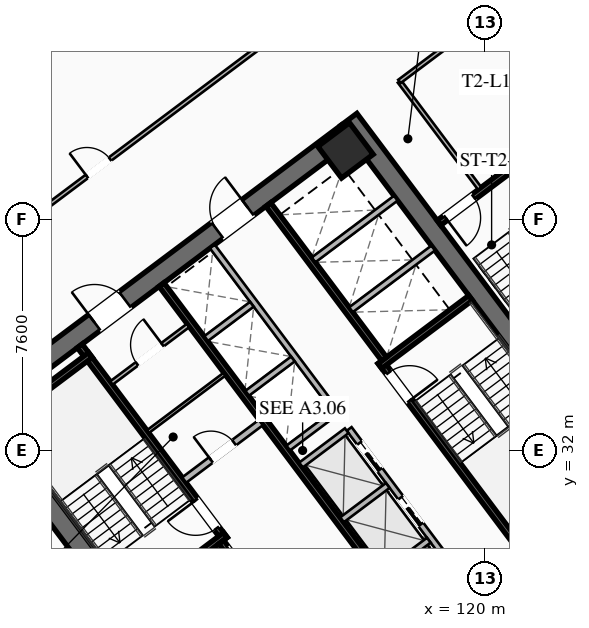
"""IFC4 building model, lengths in metres.
Left out: names, types, materials, properties, quantities, classifications, styles, units other than length and angle.
Written with IfcOpenShell. Run it as: python <this file> out.ifc"""

import sys

from ifc_helpers import new_model, si_unit, direction, frame, frame_2d, origin, origin_2d, place, context, subcontext, project, spatial, rectangle, hollow_rectangle, extrude, element, fill, save


model = new_model("IFC4")
c1 = context("Model", 3, precision=1e-05, world=origin(), true_north=direction((0.0, 1.0)))
c2 = subcontext(c1, "Body", "Model", "MODEL_VIEW")
j1 = project(units=[si_unit("LENGTHUNIT", "METRE"), si_unit("PLANEANGLEUNIT", "RADIAN")], contexts=[c1])
p1 = place(None, origin())
s1 = spatial("IfcSite", under=j1, at=p1, CompositionType="ELEMENT")
p2 = place(p1, origin())
s2 = spatial("IfcBuilding", under=s1, at=p2, CompositionType="ELEMENT")
p3 = place(p2, frame((0.0, 0.0, 56.55)))
s3 = spatial("IfcBuildingStorey", under=s2, at=p3, CompositionType="ELEMENT", Elevation=56.55)
for number, where, z_axis, x_axis in (
    (1, (112.476, 21.107, 0.0), (0.0, 0.0, 1.0), (-0.6, 0.8, 0.0)),
    (2, (115.524, 42.893, 0.0), (0.0, 0.0, 1.0), (0.6, -0.8, 0.0)),
):
    element("IfcWall", number, at=place(p3, frame(where, z_axis=z_axis, x_axis=x_axis)), inside=s3, PredefinedType="SHEAR", context=c2, shape_type="SweptSolid", body=[
        extrude(rectangle(XDim=15.6, YDim=0.65, at=frame_2d((7.8, 0.0))), origin(), (0.0, 0.0, 1.0), 3.55),
    ])
p4 = place(p3, frame((124.429, 30.478, 0.0), z_axis=(0.0, 0.0, 1.0), x_axis=(-0.799998028465, -0.600002628705, 0.0)))
e3 = element("IfcWall", 3, at=p4, inside=s3, PredefinedType="SHEAR", context=c2, shape_type="SweptSolid", body=[
    extrude(rectangle(XDim=14.86, YDim=0.65, at=frame_2d((7.43, 0.0))), origin(), (0.0, 0.0, 1.0), 3.55),
])
p5 = place(p4, frame((9.13, 0.0, 0.0)))
e4 = element("IfcOpeningElement", 4, at=p5, cuts=e3, PredefinedType="OPENING", context=c2, shape_type="SweptSolid", body=[
    extrude(rectangle(XDim=1.25, YDim=2.25, at=frame_2d((0.625, 1.125))), frame((0.0, 0.335, 0.0), z_axis=(0.0, -1.0, 0.0), x_axis=(1.0, 0.0, 0.0)), (0.0, 0.0, 1.0), 0.67),
])
p6 = place(p4, frame((4.08, 0.0, 0.0)))
e5 = element("IfcOpeningElement", 5, at=p6, cuts=e3, PredefinedType="OPENING", context=c2, shape_type="SweptSolid", body=[
    extrude(rectangle(XDim=1.25, YDim=2.25, at=frame_2d((0.625, 1.125))), frame((0.0, 0.335, 0.0), z_axis=(0.0, -1.0, 0.0), x_axis=(1.0, 0.0, 0.0)), (0.0, 0.0, 1.0), 0.67),
])
p7 = place(p3, frame((103.571, 33.522, 0.0), z_axis=(0.0, 0.0, 1.0), x_axis=(0.799998028465, 0.600002628705, 0.0)))
e6 = element("IfcWall", 6, at=p7, inside=s3, PredefinedType="SHEAR", context=c2, shape_type="SweptSolid", body=[
    extrude(rectangle(XDim=14.86, YDim=0.65, at=frame_2d((7.43, 0.0))), origin(), (0.0, 0.0, 1.0), 3.55),
])
p8 = place(p7, frame((4.48, 0.0, 0.0)))
e7 = element("IfcOpeningElement", 7, at=p8, cuts=e6, PredefinedType="OPENING", context=c2, shape_type="SweptSolid", body=[
    extrude(rectangle(XDim=1.25, YDim=2.25, at=frame_2d((0.625, 1.125))), frame((0.0, 0.335, 0.0), z_axis=(0.0, -1.0, 0.0), x_axis=(1.0, 0.0, 0.0)), (0.0, 0.0, 1.0), 0.67),
])
p9 = place(p7, frame((9.53, 0.0, 0.0)))
e8 = element("IfcOpeningElement", 8, at=p9, cuts=e6, PredefinedType="OPENING", context=c2, shape_type="SweptSolid", body=[
    extrude(rectangle(XDim=1.25, YDim=2.25, at=frame_2d((0.625, 1.125))), frame((0.0, 0.335, 0.0), z_axis=(0.0, -1.0, 0.0), x_axis=(1.0, 0.0, 0.0)), (0.0, 0.0, 1.0), 0.67),
])
p10 = place(p3, frame((115.41, 41.87, 0.0), z_axis=(0.0, 0.0, 1.0), x_axis=(0.799999996291, 0.600000004945, 0.0)))
e9 = element("IfcColumn", 9, at=p10, inside=s3, PredefinedType="COLUMN", context=c2, shape_type="SweptSolid", body=[
    extrude(hollow_rectangle(XDim=1.3, YDim=1.3, WallThickness=0.05, at=origin_2d()), origin(), (0.0, 0.0, 1.0), 3.35),
])
p11 = place(p3, frame((111.44, 29.08, 0.0), z_axis=(0.0, 0.0, 1.0), x_axis=(-0.600009827119, 0.799992629566, 0.0)))
e10 = element("IfcWall", 10, at=p11, inside=s3, PredefinedType="SHEAR", context=c2, shape_type="SweptSolid", body=[
    extrude(rectangle(XDim=7.95, YDim=0.2, at=frame_2d((3.975, 0.0))), origin(), (0.0, 0.0, 1.0), 3.35),
])
p12 = place(p11, frame((0.45, 0.0, 0.0)))
e11 = element("IfcOpeningElement", 11, at=p12, cuts=e10, PredefinedType="OPENING", context=c2, shape_type="SweptSolid", body=[
    extrude(rectangle(XDim=1.15, YDim=2.2, at=frame_2d((0.575, 1.1))), frame((0.0, 0.11, 0.0), z_axis=(0.0, -1.0, 0.0), x_axis=(1.0, 0.0, 0.0)), (0.0, 0.0, 1.0), 0.22),
])
for number, where, z_axis, x_axis in (
    (12, (108.476, 26.982, 0.0), (0.0, 0.0, 1.0), (0.8, 0.6, 0.0)),
    (13, (104.036, 32.902, 0.0), (0.0, 0.0, 1.0), (0.8, 0.6, 0.0)),
):
    element("IfcWall", number, at=place(p3, frame(where, z_axis=z_axis, x_axis=x_axis)), inside=s3, PredefinedType="SHEAR", context=c2, shape_type="SweptSolid", body=[
        extrude(rectangle(XDim=3.73, YDim=0.2, at=frame_2d((1.865, 0.0))), origin(), (0.0, 0.0, 1.0), 3.35),
    ])
p13 = place(p3, frame((116.56, 34.92, 0.0), z_axis=(0.0, 0.0, 1.0), x_axis=(0.600009827119, -0.799992629566, 0.0)))
e14 = element("IfcWall", 14, at=p13, inside=s3, PredefinedType="SHEAR", context=c2, shape_type="SweptSolid", body=[
    extrude(rectangle(XDim=7.95, YDim=0.2, at=frame_2d((3.975, 0.0))), origin(), (0.0, 0.0, 1.0), 3.35),
])
p14 = place(p13, frame((0.45, 0.0, 0.0)))
e15 = element("IfcOpeningElement", 15, at=p14, cuts=e14, PredefinedType="OPENING", context=c2, shape_type="SweptSolid", body=[
    extrude(rectangle(XDim=1.15, YDim=2.2, at=frame_2d((0.575, 1.1))), frame((0.0, 0.11, 0.0), z_axis=(0.0, -1.0, 0.0), x_axis=(1.0, 0.0, 0.0)), (0.0, 0.0, 1.0), 0.22),
])
p15 = place(p3, frame((116.54, 34.78, 0.0), z_axis=(0.0, 0.0, 1.0), x_axis=(0.799984290658, 0.600020945218, 0.0)))
e16 = element("IfcWall", 16, at=p15, inside=s3, PredefinedType="SHEAR", context=c2, shape_type="SweptSolid", body=[
    extrude(rectangle(XDim=3.73, YDim=0.2, at=frame_2d((1.865, 0.0))), origin(), (0.0, 0.0, 1.0), 3.35),
])
p16 = place(p3, frame((117.938, 26.016, 0.0), z_axis=(0.0, 0.0, 1.0), x_axis=(-0.600005463273, 0.799995902516, 0.0)))
e17 = element("IfcWall", 17, at=p16, inside=s3, PredefinedType="SHEAR", context=c2, shape_type="SweptSolid", body=[
    extrude(rectangle(XDim=14.3, YDim=0.2, at=frame_2d((7.15, 0.0))), origin(), (0.0, 0.0, 1.0), 3.35),
])
p17 = place(p3, frame((110.104, 31.028, 0.0), z_axis=(0.0, 0.0, 1.0), x_axis=(0.800018601094, 0.59997519774, 0.0)))
e18 = element("IfcWall", 18, at=p17, inside=s3, PredefinedType="SOLIDWALL", context=c2, shape_type="SweptSolid", body=[
    extrude(rectangle(XDim=3.15, YDim=0.22, at=frame_2d((1.575, 0.0))), origin(), (0.0, 0.0, 1.0), 2.703),
])
p18 = place(p17, frame((1.1, 0.0, 0.0)))
e19 = element("IfcOpeningElement", 19, at=p18, cuts=e18, PredefinedType="OPENING", context=c2, shape_type="SweptSolid", body=[
    extrude(rectangle(XDim=0.95, YDim=2.05, at=frame_2d((0.475, 1.025))), frame((0.0, 0.12, 0.0), z_axis=(0.0, -1.0, 0.0), x_axis=(1.0, 0.0, 0.0)), (0.0, 0.0, 1.0), 0.24),
])
p19 = place(p3, frame((115.13, 23.91, 0.0), z_axis=(0.0, 0.0, 1.0), x_axis=(-0.599975393228, 0.800018454488, 0.0)))
e20 = element("IfcWall", 20, at=p19, inside=s3, PredefinedType="SHEAR", context=c2, shape_type="SweptSolid", body=[
    extrude(rectangle(XDim=6.35, YDim=0.2, at=frame_2d((3.175, 0.0))), origin(), (0.0, 0.0, 1.0), 3.35),
])
p20 = place(p19, frame((4.775, 0.0, 0.0)))
e21 = element("IfcOpeningElement", 21, at=p20, cuts=e20, PredefinedType="OPENING", context=c2, shape_type="SweptSolid", body=[
    extrude(rectangle(XDim=1.3, YDim=2.25, at=frame_2d((0.65, 1.125))), frame((0.0, 0.11, 0.0), z_axis=(0.0, -1.0, 0.0), x_axis=(1.0, 0.0, 0.0)), (0.0, 0.0, 1.0), 0.22),
])
p21 = place(p19, frame((2.775, 0.0, 0.0)))
e22 = element("IfcOpeningElement", 22, at=p21, cuts=e20, PredefinedType="OPENING", context=c2, shape_type="SweptSolid", body=[
    extrude(rectangle(XDim=1.3, YDim=2.25, at=frame_2d((0.65, 1.125))), frame((0.0, 0.11, 0.0), z_axis=(0.0, -1.0, 0.0), x_axis=(1.0, 0.0, 0.0)), (0.0, 0.0, 1.0), 0.22),
])
p22 = place(p19, frame((0.575, 0.0, 0.0)))
e23 = element("IfcOpeningElement", 23, at=p22, cuts=e20, PredefinedType="OPENING", context=c2, shape_type="SweptSolid", body=[
    extrude(rectangle(XDim=1.3, YDim=2.25, at=frame_2d((0.65, 1.125))), frame((0.0, 0.11, 0.0), z_axis=(0.0, -1.0, 0.0), x_axis=(1.0, 0.0, 0.0)), (0.0, 0.0, 1.0), 0.22),
])
p23 = place(p3, frame((112.87, 40.09, 0.0), z_axis=(0.0, 0.0, 1.0), x_axis=(0.599975393228, -0.800018454488, 0.0)))
e24 = element("IfcWall", 24, at=p23, inside=s3, PredefinedType="SHEAR", context=c2, shape_type="SweptSolid", body=[
    extrude(rectangle(XDim=6.35, YDim=0.2, at=frame_2d((3.175, 0.0))), origin(), (0.0, 0.0, 1.0), 3.35),
])
for number, where, z_axis, x_axis in (
    (25, (115.59, 36.63, 0.0), (0.0, 0.0, 1.0), (0.8, 0.6, 0.0)),
    (26, (114.36, 38.27, 0.0), (0.0, 0.0, 1.0), (0.8, 0.6, 0.0)),
):
    element("IfcWall", number, at=place(p3, frame(where, z_axis=z_axis, x_axis=x_axis)), inside=s3, PredefinedType="SOLIDWALL", context=c2, shape_type="SweptSolid", body=[
        extrude(rectangle(XDim=3.38, YDim=0.2, at=frame_2d((1.69, 0.0))), origin(), (0.0, 0.0, 1.0), 3.35),
    ])
p24 = place(p3, frame((107.71, 34.22, 0.0), z_axis=(0.0, 0.0, 1.0), x_axis=(0.799981399002, 0.60002480053, 0.0)))
e27 = element("IfcWall", 27, at=p24, inside=s3, PredefinedType="PARTITIONING", context=c2, shape_type="SweptSolid", body=[
    extrude(rectangle(XDim=3.15, YDim=0.135, at=frame_2d((1.575, 0.0))), origin(), (0.0, 0.0, 1.0), 2.703),
])
p25 = place(p24, frame((1.05, 0.0, 0.0)))
e28 = element("IfcOpeningElement", 28, at=p25, cuts=e27, PredefinedType="OPENING", context=c2, shape_type="SweptSolid", body=[
    extrude(rectangle(XDim=1.05, YDim=2.2, at=frame_2d((0.525, 1.1))), frame((0.0, 0.077, 0.0), z_axis=(0.0, -1.0, 0.0), x_axis=(1.0, 0.0, 0.0)), (0.0, 0.0, 1.0), 0.155),
])
p26 = place(p3, frame((108.91, 32.62, 0.0), z_axis=(0.0, 0.0, 1.0), x_axis=(0.800018601094, 0.59997519774, 0.0)))
e29 = element("IfcWall", 29, at=p26, inside=s3, PredefinedType="PARTITIONING", context=c2, shape_type="SweptSolid", body=[
    extrude(rectangle(XDim=3.15, YDim=0.11, at=frame_2d((1.575, 0.0))), origin(), (0.0, 0.0, 1.0), 2.703),
])
p27 = place(p3, frame((119.61, 27.27, 0.0), z_axis=(0.0, 0.0, 1.0), x_axis=(-0.600011488909, 0.79999138319, 0.0)))
e30 = element("IfcWall", 30, at=p27, inside=s3, PredefinedType="SOLIDWALL", context=c2, shape_type="SweptSolid", body=[
    extrude(rectangle(XDim=6.8, YDim=0.2, at=frame_2d((3.4, 0.0))), origin(), (0.0, 0.0, 1.0), 3.35),
])
p28 = place(p27, frame((0.625, 0.0, 0.0)))
e31 = element("IfcOpeningElement", 31, at=p28, cuts=e30, PredefinedType="OPENING", context=c2, shape_type="SweptSolid", body=[
    extrude(rectangle(XDim=1.1, YDim=2.2, at=frame_2d((0.55, 1.1))), frame((0.0, 0.11, 0.0), z_axis=(0.0, -1.0, 0.0), x_axis=(1.0, 0.0, 0.0)), (0.0, 0.0, 1.0), 0.22),
])
p29 = place(p27, frame((2.875, 0.0, 0.0)))
e32 = element("IfcOpeningElement", 32, at=p29, cuts=e30, PredefinedType="OPENING", context=c2, shape_type="SweptSolid", body=[
    extrude(rectangle(XDim=1.1, YDim=2.2, at=frame_2d((0.55, 1.1))), frame((0.0, 0.11, 0.0), z_axis=(0.0, -1.0, 0.0), x_axis=(1.0, 0.0, 0.0)), (0.0, 0.0, 1.0), 0.22),
])
p30 = place(p27, frame((5.125, 0.0, 0.0)))
e33 = element("IfcOpeningElement", 33, at=p30, cuts=e30, PredefinedType="OPENING", context=c2, shape_type="SweptSolid", body=[
    extrude(rectangle(XDim=1.1, YDim=2.2, at=frame_2d((0.55, 1.1))), frame((0.0, 0.11, 0.0), z_axis=(0.0, -1.0, 0.0), x_axis=(1.0, 0.0, 0.0)), (0.0, 0.0, 1.0), 0.22),
])
p31 = place(p3, frame((116.646, 27.922, 0.0), z_axis=(0.0, 0.0, 1.0), x_axis=(0.8, 0.6, 0.0)))
e34 = element("IfcWall", 34, at=p31, inside=s3, PredefinedType="SOLIDWALL", context=c2, shape_type="SweptSolid", body=[
    extrude(rectangle(XDim=1.88, YDim=0.2, at=frame_2d((0.94, 0.0))), origin(), (0.0, 0.0, 1.0), 3.35),
])
p32 = place(p3, frame((115.296, 29.722, 0.0), z_axis=(0.0, 0.0, 1.0), x_axis=(0.799984418148, 0.600020775241, 0.0)))
e35 = element("IfcWall", 35, at=p32, inside=s3, PredefinedType="SOLIDWALL", context=c2, shape_type="SweptSolid", body=[
    extrude(rectangle(XDim=1.88, YDim=0.2, at=frame_2d((0.94, 0.0))), origin(), (0.0, 0.0, 1.0), 3.35),
])
p33 = place(p3, frame((113.946, 31.522, 0.0), z_axis=(0.0, 0.0, 1.0), x_axis=(0.8, 0.6, 0.0)))
e36 = element("IfcWall", 36, at=p33, inside=s3, PredefinedType="SOLIDWALL", context=c2, shape_type="SweptSolid", body=[
    extrude(rectangle(XDim=1.88, YDim=0.2, at=frame_2d((0.94, 0.0))), origin(), (0.0, 0.0, 1.0), 3.35),
])
p34 = place(p3, frame((115.11, 33.27, 0.0), z_axis=(0.0, 0.0, 1.0), x_axis=(-0.600011488909, 0.79999138319, 0.0)))
e37 = element("IfcWall", 37, at=p34, inside=s3, PredefinedType="SOLIDWALL", context=c2, shape_type="SweptSolid", body=[
    extrude(rectangle(XDim=6.8, YDim=0.2, at=frame_2d((3.4, 0.0))), origin(), (0.0, 0.0, 1.0), 3.35),
])
p35 = place(p3, frame((113.526, 32.082, 0.0), z_axis=(0.0, 0.0, 1.0), x_axis=(0.800046745961, 0.599937666993, 0.0)))
e38 = element("IfcWall", 38, at=p35, inside=s3, PredefinedType="SOLIDWALL", context=c2, shape_type="SweptSolid", body=[
    extrude(rectangle(XDim=1.88, YDim=0.2, at=frame_2d((0.94, 0.0))), origin(), (0.0, 0.0, 1.0), 3.35),
])
p36 = place(p3, frame((112.176, 33.882, 0.0), z_axis=(0.0, 0.0, 1.0), x_axis=(0.8, 0.6, 0.0)))
e39 = element("IfcWall", 39, at=p36, inside=s3, PredefinedType="SOLIDWALL", context=c2, shape_type="SweptSolid", body=[
    extrude(rectangle(XDim=1.88, YDim=0.2, at=frame_2d((0.94, 0.0))), origin(), (0.0, 0.0, 1.0), 3.35),
])
p37 = place(p3, frame((110.826, 35.682, 0.0), z_axis=(0.0, 0.0, 1.0), x_axis=(0.799984418148, 0.600020775241, 0.0)))
e40 = element("IfcWall", 40, at=p37, inside=s3, PredefinedType="SOLIDWALL", context=c2, shape_type="SweptSolid", body=[
    extrude(rectangle(XDim=1.88, YDim=0.2, at=frame_2d((0.94, 0.0))), origin(), (0.0, 0.0, 1.0), 3.35),
])
p38 = place(p3, frame((121.204, 41.528, 0.0), z_axis=(0.0, 0.0, 1.0), x_axis=(-0.800017232136, -0.599977023131, 0.0)))
e41 = element("IfcWall", 41, at=p38, inside=s3, PredefinedType="SHEAR", context=c2, shape_type="SweptSolid", body=[
    extrude(rectangle(XDim=3.4, YDim=0.2, at=frame_2d((1.7, 0.0))), origin(), (0.0, 0.0, 1.0), 3.35),
])
p39 = place(p38, frame((1.975, 0.0, 0.0)))
e42 = element("IfcOpeningElement", 42, at=p39, cuts=e41, PredefinedType="OPENING", context=c2, shape_type="SweptSolid", body=[
    extrude(rectangle(XDim=1.15, YDim=2.2, at=frame_2d((0.575, 1.1))), frame((0.0, 0.11, 0.0), z_axis=(0.0, -1.0, 0.0), x_axis=(1.0, 0.0, 0.0)), (0.0, 0.0, 1.0), 0.22),
])
p40 = place(p3, frame((119.824, 40.618, 0.0), z_axis=(0.0, 0.0, 1.0), x_axis=(-0.599982243973, 0.800013316712, 0.0)))
e43 = element("IfcWall", 43, at=p40, inside=s3, PredefinedType="PARTITIONING", context=c2, shape_type="SweptSolid", body=[
    extrude(rectangle(XDim=4.4, YDim=0.135, at=frame_2d((2.2, 0.0))), origin(), (0.0, 0.0, 1.0), 2.703),
])
p41 = place(p3, frame((98.174, 34.468, 0.0), z_axis=(0.0, 0.0, 1.0), x_axis=(0.800000982127, 0.599998690494, 0.0)))
e44 = element("IfcWall", 44, at=p41, inside=s3, PredefinedType="PARTITIONING", context=c2, shape_type="SweptSolid", body=[
    extrude(rectangle(XDim=29.83, YDim=0.135, at=frame_2d((14.915, 0.0))), origin(), (0.0, 0.0, 1.0), 2.703),
])
p42 = place(p41, frame((0.3, 0.0, 0.0)))
e45 = element("IfcOpeningElement", 45, at=p42, cuts=e44, PredefinedType="OPENING", context=c2, shape_type="SweptSolid", body=[
    extrude(rectangle(XDim=0.95, YDim=2.05, at=frame_2d((0.475, 1.025))), frame((0.0, 0.077, 0.0), z_axis=(0.0, -1.0, 0.0), x_axis=(1.0, 0.0, 0.0)), (0.0, 0.0, 1.0), 0.155),
])
p43 = place(p41, frame((10.913, 0.0, 0.0)))
e46 = element("IfcOpeningElement", 46, at=p43, cuts=e44, PredefinedType="OPENING", context=c2, shape_type="SweptSolid", body=[
    extrude(rectangle(XDim=0.95, YDim=2.05, at=frame_2d((0.475, 1.025))), frame((0.0, 0.077, 0.0), z_axis=(0.0, -1.0, 0.0), x_axis=(1.0, 0.0, 0.0)), (0.0, 0.0, 1.0), 0.155),
])
p44 = place(p41, frame((28.58, 0.0, 0.0)))
e47 = element("IfcOpeningElement", 47, at=p44, cuts=e44, PredefinedType="OPENING", context=c2, shape_type="SweptSolid", body=[
    extrude(rectangle(XDim=0.95, YDim=2.05, at=frame_2d((0.475, 1.025))), frame((0.0, 0.077, 0.0), z_axis=(0.0, -1.0, 0.0), x_axis=(1.0, 0.0, 0.0)), (0.0, 0.0, 1.0), 0.155),
])
p45 = place(p3, frame((135.46, 34.47, 0.0), z_axis=(0.0, 0.0, 1.0), x_axis=(-0.800000982127, -0.599998690494, 0.0)))
e48 = element("IfcWall", 48, at=p45, inside=s3, PredefinedType="PARTITIONING", context=c2, shape_type="SweptSolid", body=[
    extrude(rectangle(XDim=29.83, YDim=0.135, at=frame_2d((14.915, 0.0))), origin(), (0.0, 0.0, 1.0), 2.703),
])
p46 = place(p45, frame((28.5, 0.0, 0.0)))
e49 = element("IfcOpeningElement", 49, at=p46, cuts=e48, PredefinedType="OPENING", context=c2, shape_type="SweptSolid", body=[
    extrude(rectangle(XDim=0.95, YDim=2.05, at=frame_2d((0.475, 1.025))), frame((0.0, 0.077, 0.0), z_axis=(0.0, -1.0, 0.0), x_axis=(1.0, 0.0, 0.0)), (0.0, 0.0, 1.0), 0.155),
])
p47 = place(p45, frame((17.938, 0.0, 0.0)))
e50 = element("IfcOpeningElement", 50, at=p47, cuts=e48, PredefinedType="OPENING", context=c2, shape_type="SweptSolid", body=[
    extrude(rectangle(XDim=0.95, YDim=2.05, at=frame_2d((0.475, 1.025))), frame((0.0, 0.077, 0.0), z_axis=(0.0, -1.0, 0.0), x_axis=(1.0, 0.0, 0.0)), (0.0, 0.0, 1.0), 0.155),
])
p48 = place(p45, frame((0.38, 0.0, 0.0)))
e51 = element("IfcOpeningElement", 51, at=p48, cuts=e48, PredefinedType="OPENING", context=c2, shape_type="SweptSolid", body=[
    extrude(rectangle(XDim=0.95, YDim=2.05, at=frame_2d((0.475, 1.025))), frame((0.0, 0.077, 0.0), z_axis=(0.0, -1.0, 0.0), x_axis=(1.0, 0.0, 0.0)), (0.0, 0.0, 1.0), 0.155),
])
p49 = place(p3, frame((126.664, 51.248, 0.0), z_axis=(0.0, 0.0, 1.0), x_axis=(-0.799995055373, -0.600006592779, 0.0)))
e52 = element("IfcWall", 52, at=p49, inside=s3, PredefinedType="PARTITIONING", context=c2, shape_type="SweptSolid", body=[
    extrude(rectangle(XDim=11.85, YDim=0.135, at=frame_2d((5.925, 0.0))), origin(), (0.0, 0.0, 1.0), 2.703),
])
p50 = place(p49, frame((5.8, 0.0, 0.0)))
e53 = element("IfcOpeningElement", 53, at=p50, cuts=e52, PredefinedType="OPENING", context=c2, shape_type="SweptSolid", body=[
    extrude(rectangle(XDim=0.95, YDim=2.05, at=frame_2d((0.475, 1.025))), frame((0.0, 0.077, 0.0), z_axis=(0.0, -1.0, 0.0), x_axis=(1.0, 0.0, 0.0)), (0.0, 0.0, 1.0), 0.155),
])
p51 = place(p3, frame((111.548, 16.636, 0.0), z_axis=(0.0, 0.0, 1.0), x_axis=(-0.600003517529, 0.799997361841, 0.0)))
e54 = element("IfcWall", 54, at=p51, inside=s3, PredefinedType="PARTITIONING", context=c2, shape_type="SweptSolid", body=[
    extrude(rectangle(XDim=22.21, YDim=0.135, at=frame_2d((11.105, 0.0))), origin(), (0.0, 0.0, 1.0), 2.703),
])
p52 = place(p51, frame((20.96, 0.0, 0.0)))
e55 = element("IfcOpeningElement", 55, at=p52, cuts=e54, PredefinedType="OPENING", context=c2, shape_type="SweptSolid", body=[
    extrude(rectangle(XDim=0.95, YDim=2.05, at=frame_2d((0.475, 1.025))), frame((0.0, 0.077, 0.0), z_axis=(0.0, -1.0, 0.0), x_axis=(1.0, 0.0, 0.0)), (0.0, 0.0, 1.0), 0.155),
])
p53 = place(p8, origin())
e56 = element("IfcDoor", 56, at=p53, inside=s3, OperationType="SINGLE_SWING_LEFT", PredefinedType="DOOR", context=c2, shape_type="SweptSolid", body=[
    extrude(rectangle(XDim=1.25, YDim=2.25, at=frame_2d((0.625, 1.125))), frame((0.0, 0.025, 0.0), z_axis=(0.0, -1.0, 0.0), x_axis=(1.0, 0.0, 0.0)), (0.0, 0.0, 1.0), 0.05),
])
fill(e7, e56)
p54 = place(p9, origin())
e57 = element("IfcDoor", 57, at=p54, inside=s3, OperationType="SINGLE_SWING_RIGHT", PredefinedType="DOOR", context=c2, shape_type="SweptSolid", body=[
    extrude(rectangle(XDim=1.25, YDim=2.25, at=frame_2d((0.625, 1.125))), frame((0.0, 0.025, 0.0), z_axis=(0.0, -1.0, 0.0), x_axis=(1.0, 0.0, 0.0)), (0.0, 0.0, 1.0), 0.05),
])
fill(e8, e57)
p55 = place(p12, origin())
e58 = element("IfcDoor", 58, at=p55, inside=s3, OperationType="SINGLE_SWING_RIGHT", PredefinedType="DOOR", context=c2, shape_type="SweptSolid", body=[
    extrude(rectangle(XDim=1.15, YDim=2.2, at=frame_2d((0.575, 1.1))), frame((0.0, 0.025, 0.0), z_axis=(0.0, -1.0, 0.0), x_axis=(1.0, 0.0, 0.0)), (0.0, 0.0, 1.0), 0.05),
])
fill(e11, e58)
p56 = place(p14, origin())
e59 = element("IfcDoor", 59, at=p56, inside=s3, OperationType="SINGLE_SWING_RIGHT", PredefinedType="DOOR", context=c2, shape_type="SweptSolid", body=[
    extrude(rectangle(XDim=1.15, YDim=2.2, at=frame_2d((0.575, 1.1))), frame((0.0, 0.025, 0.0), z_axis=(0.0, -1.0, 0.0), x_axis=(1.0, 0.0, 0.0)), (0.0, 0.0, 1.0), 0.05),
])
fill(e15, e59)
p57 = place(p25, origin())
e60 = element("IfcDoor", 60, at=p57, inside=s3, OperationType="SINGLE_SWING_RIGHT", PredefinedType="DOOR", context=c2, shape_type="SweptSolid", body=[
    extrude(rectangle(XDim=1.05, YDim=2.2, at=frame_2d((0.525, 1.1))), frame((0.0, 0.025, 0.0), z_axis=(0.0, -1.0, 0.0), x_axis=(1.0, 0.0, 0.0)), (0.0, 0.0, 1.0), 0.05),
])
fill(e28, e60)
p58 = place(p18, origin())
e61 = element("IfcDoor", 61, at=p58, inside=s3, OperationType="SINGLE_SWING_LEFT", PredefinedType="DOOR", context=c2, shape_type="SweptSolid", body=[
    extrude(rectangle(XDim=0.95, YDim=2.05, at=frame_2d((0.475, 1.025))), frame((0.0, 0.025, 0.0), z_axis=(0.0, -1.0, 0.0), x_axis=(1.0, 0.0, 0.0)), (0.0, 0.0, 1.0), 0.05),
])
fill(e19, e61)
p59 = place(p39, origin())
e62 = element("IfcDoor", 62, at=p59, inside=s3, OperationType="SINGLE_SWING_RIGHT", PredefinedType="DOOR", context=c2, shape_type="SweptSolid", body=[
    extrude(rectangle(XDim=1.15, YDim=2.2, at=frame_2d((0.575, 1.1))), frame((0.0, 0.025, 0.0), z_axis=(0.0, -1.0, 0.0), x_axis=(1.0, 0.0, 0.0)), (0.0, 0.0, 1.0), 0.05),
])
fill(e42, e62)
p60 = place(p43, origin())
e63 = element("IfcDoor", 63, at=p60, inside=s3, OperationType="SINGLE_SWING_LEFT", PredefinedType="DOOR", context=c2, shape_type="SweptSolid", body=[
    extrude(rectangle(XDim=0.95, YDim=2.05, at=frame_2d((0.475, 1.025))), frame((0.0, 0.025, 0.0), z_axis=(0.0, -1.0, 0.0), x_axis=(1.0, 0.0, 0.0)), (0.0, 0.0, 1.0), 0.05),
])
fill(e46, e63)
p61 = place(p29, origin())
e64 = element("IfcDoor", 64, at=p61, inside=s3, OperationType="SLIDING_TO_LEFT", PredefinedType="DOOR", context=c2, shape_type="SweptSolid", body=[
    extrude(rectangle(XDim=1.1, YDim=2.2, at=frame_2d((0.55, 1.1))), frame((0.0, 0.025, 0.0), z_axis=(0.0, -1.0, 0.0), x_axis=(1.0, 0.0, 0.0)), (0.0, 0.0, 1.0), 0.05),
])
fill(e32, e64)
p62 = place(p30, origin())
e65 = element("IfcDoor", 65, at=p62, inside=s3, OperationType="SLIDING_TO_LEFT", PredefinedType="DOOR", context=c2, shape_type="SweptSolid", body=[
    extrude(rectangle(XDim=1.1, YDim=2.2, at=frame_2d((0.55, 1.1))), frame((0.0, 0.025, 0.0), z_axis=(0.0, -1.0, 0.0), x_axis=(1.0, 0.0, 0.0)), (0.0, 0.0, 1.0), 0.05),
])
fill(e33, e65)
save(model, sys.argv[1])
